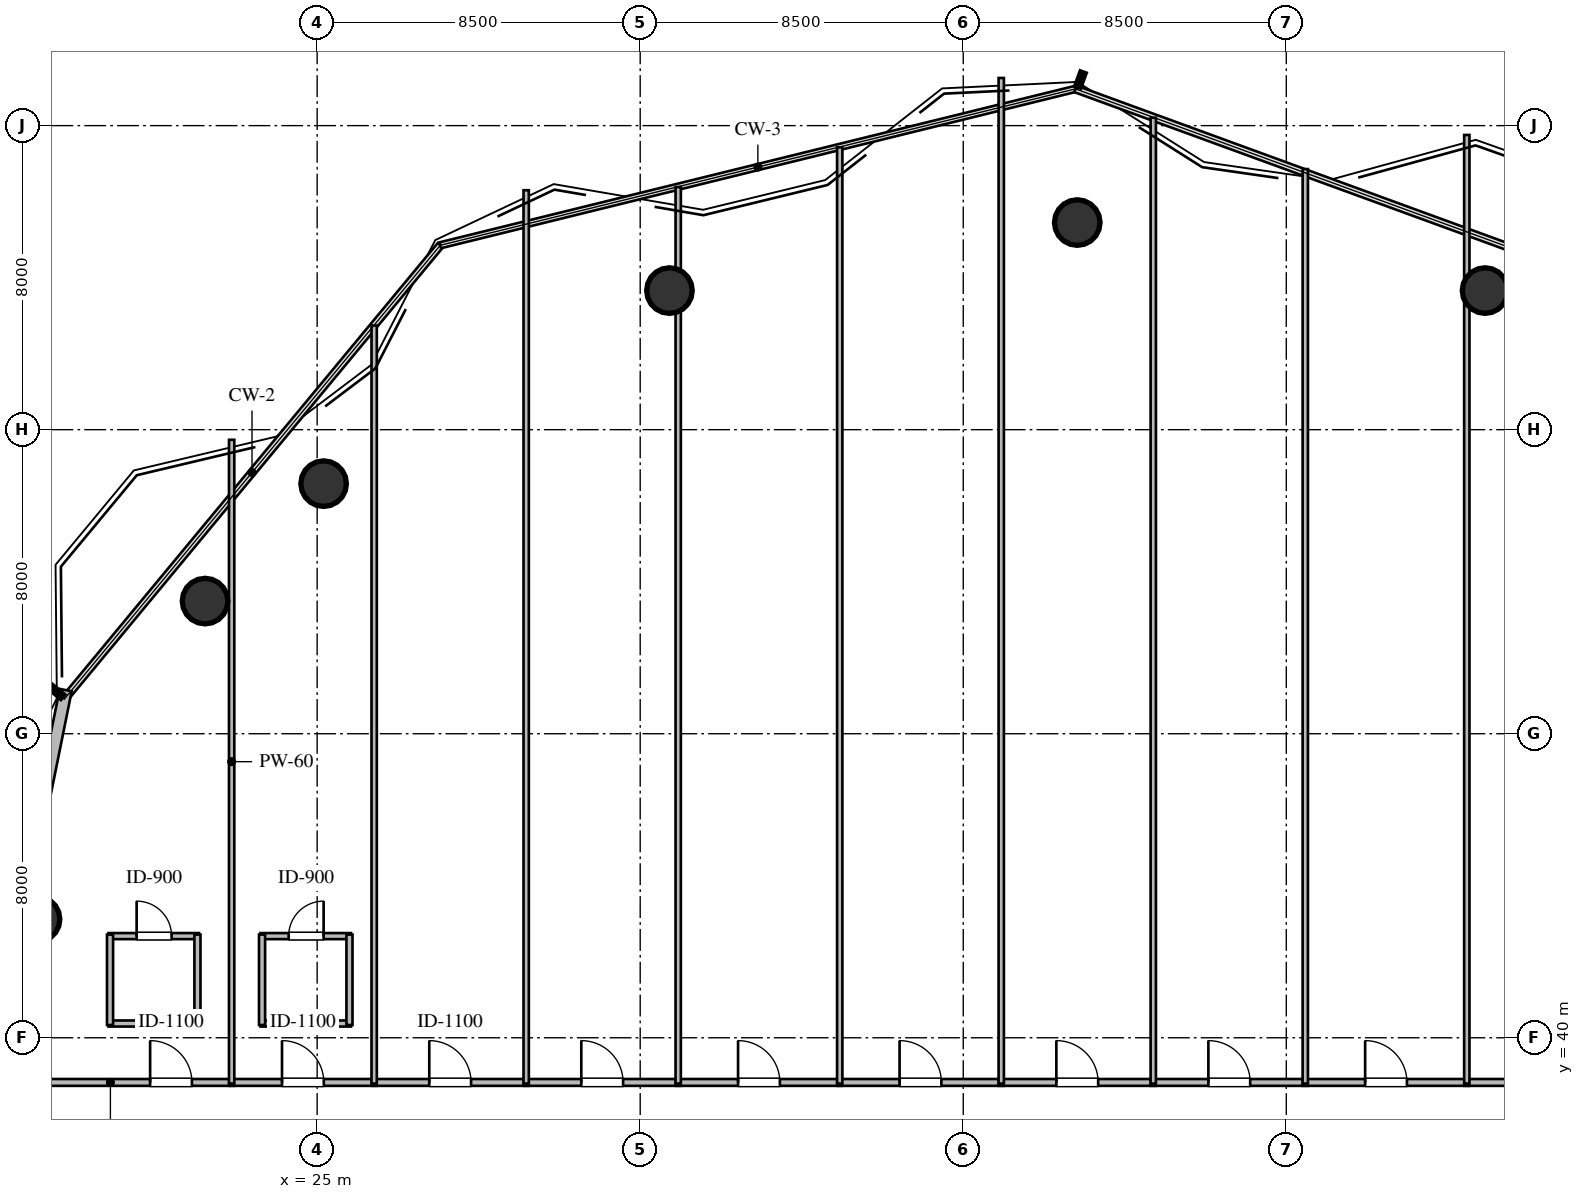
"""IFC4 building model, lengths in metres.
Left out: names, types, materials, properties, quantities, classifications, styles, units other than length and angle.
Written with IfcOpenShell. Run it as: python <this file> out.ifc"""

import sys

from ifc_helpers import new_model, si_unit, direction, frame, frame_2d, origin, origin_2d, place, context, subcontext, project, spatial, rectangle, circle, extrude, element, fill, save


model = new_model("IFC4")
c1 = context("Model", 3, precision=1e-05, world=origin(), true_north=direction((0.0, 1.0)))
c2 = subcontext(c1, "Body", "Model", "MODEL_VIEW")
j1 = project(units=[si_unit("LENGTHUNIT", "METRE"), si_unit("PLANEANGLEUNIT", "RADIAN")], contexts=[c1])
p1 = place(None, origin())
s1 = spatial("IfcSite", under=j1, at=p1, CompositionType="ELEMENT")
p2 = place(p1, origin())
s2 = spatial("IfcBuilding", under=s1, at=p2, CompositionType="ELEMENT")
p3 = place(p2, frame((0.0, 0.0, 142.2)))
s3 = spatial("IfcBuildingStorey", under=s2, at=p3, CompositionType="ELEMENT", Elevation=142.2)
for number, where, z_axis, x_axis in (
    (1, (55.73, 59.66, 0.0), (0.0, 0.0, 1.0), (1.0, 0.0, 0.0)),
    (2, (45.0, 61.45, 0.0), (0.0, 0.0, 1.0), (1.0, 0.0, 0.0)),
    (3, (34.27, 59.66, 0.0), (0.0, 0.0, 1.0), (1.0, 0.0, 0.0)),
    (4, (25.17, 54.58, 0.0), (0.0, 0.0, 1.0), (1.0, 0.0, 0.0)),
    (5, (22.05, 51.49, 0.0), (0.0, 0.0, 1.0), (1.0, 0.0, 0.0)),
    (6, (17.63, 43.12, 0.0), (0.0, 0.0, 1.0), (1.0, 0.0, 0.0)),
):
    element("IfcColumn", number, at=place(p3, frame(where, z_axis=z_axis, x_axis=x_axis)), inside=s3, PredefinedType="COLUMN", context=c2, shape_type="SweptSolid", body=[
        extrude(circle(Radius=0.6, at=origin_2d()), origin(), (0.0, 0.0, 1.0), 3.6),
    ])
p4 = place(p3, frame((15.514, 34.967, 0.0), z_axis=(0.0, 0.0, 1.0), x_axis=(0.198370893133, 0.980127026848, 0.0)))
e7 = element("IfcWall", 7, at=p4, inside=s3, PredefinedType="STANDARD", context=c2, shape_type="SweptSolid", body=[
    extrude(rectangle(XDim=14.469, YDim=0.32, at=frame_2d((7.234, 0.0))), origin(), (0.0, 0.0, 1.0), 3.36),
])
p5 = place(p3, frame((19.51, 40.375, 0.0), z_axis=(0.0, 0.0, 1.0), x_axis=(1.0, 0.0, 0.0)))
e8 = element("IfcWall", 8, at=p5, inside=s3, PredefinedType="PLUMBINGWALL", context=c2, shape_type="SweptSolid", body=[
    extrude(rectangle(XDim=2.38, YDim=0.16, at=frame_2d((1.19, 0.0))), origin(), (0.0, 0.0, 1.0), 3.36),
])
p6 = place(p3, frame((19.51, 42.675, 0.0), z_axis=(0.0, 0.0, 1.0), x_axis=(1.0, 0.0, 0.0)))
e9 = element("IfcWall", 9, at=p6, inside=s3, PredefinedType="PLUMBINGWALL", context=c2, shape_type="SweptSolid", body=[
    extrude(rectangle(XDim=2.38, YDim=0.16, at=frame_2d((1.19, 0.0))), origin(), (0.0, 0.0, 1.0), 3.36),
])
p7 = place(p6, frame((0.74, 0.0, 0.0)))
e10 = element("IfcOpeningElement", 10, at=p7, cuts=e9, PredefinedType="OPENING", context=c2, shape_type="SweptSolid", body=[
    extrude(rectangle(XDim=0.92, YDim=2.1, at=frame_2d((0.46, 1.05))), frame((0.0, 0.09, 0.0), z_axis=(0.0, -1.0, 0.0), x_axis=(1.0, 0.0, 0.0)), (0.0, 0.0, 1.0), 0.18),
])
p8 = place(p3, frame((19.55, 40.335, 0.0), z_axis=(0.0, 0.0, 1.0), x_axis=(0.0, 1.0, 0.0)))
e11 = element("IfcWall", 11, at=p8, inside=s3, PredefinedType="PLUMBINGWALL", context=c2, shape_type="SweptSolid", body=[
    extrude(rectangle(XDim=2.38, YDim=0.16, at=frame_2d((1.19, 0.0))), origin(), (0.0, 0.0, 1.0), 3.36),
])
p9 = place(p3, frame((21.85, 40.335, 0.0), z_axis=(0.0, 0.0, 1.0), x_axis=(0.0, 1.0, 0.0)))
e12 = element("IfcWall", 12, at=p9, inside=s3, PredefinedType="PLUMBINGWALL", context=c2, shape_type="SweptSolid", body=[
    extrude(rectangle(XDim=2.38, YDim=0.16, at=frame_2d((1.19, 0.0))), origin(), (0.0, 0.0, 1.0), 2.89),
])
p10 = place(p3, frame((23.51, 40.375, 0.0), z_axis=(0.0, 0.0, 1.0), x_axis=(1.0, 0.0, 0.0)))
e13 = element("IfcWall", 13, at=p10, inside=s3, PredefinedType="PLUMBINGWALL", context=c2, shape_type="SweptSolid", body=[
    extrude(rectangle(XDim=2.38, YDim=0.16, at=frame_2d((1.19, 0.0))), origin(), (0.0, 0.0, 1.0), 3.36),
])
p11 = place(p3, frame((23.51, 42.675, 0.0), z_axis=(0.0, 0.0, 1.0), x_axis=(1.0, 0.0, 0.0)))
e14 = element("IfcWall", 14, at=p11, inside=s3, PredefinedType="PLUMBINGWALL", context=c2, shape_type="SweptSolid", body=[
    extrude(rectangle(XDim=2.38, YDim=0.16, at=frame_2d((1.19, 0.0))), origin(), (0.0, 0.0, 1.0), 3.36),
])
p12 = place(p11, frame((0.74, 0.0, 0.0)))
e15 = element("IfcOpeningElement", 15, at=p12, cuts=e14, PredefinedType="OPENING", context=c2, shape_type="SweptSolid", body=[
    extrude(rectangle(XDim=0.92, YDim=2.1, at=frame_2d((0.46, 1.05))), frame((0.0, 0.09, 0.0), z_axis=(0.0, -1.0, 0.0), x_axis=(1.0, 0.0, 0.0)), (0.0, 0.0, 1.0), 0.18),
])
p13 = place(p3, frame((23.55, 40.335, 0.0), z_axis=(0.0, 0.0, 1.0), x_axis=(0.0, 1.0, 0.0)))
e16 = element("IfcWall", 16, at=p13, inside=s3, PredefinedType="PLUMBINGWALL", context=c2, shape_type="SweptSolid", body=[
    extrude(rectangle(XDim=2.38, YDim=0.16, at=frame_2d((1.19, 0.0))), origin(), (0.0, 0.0, 1.0), 2.89),
])
p14 = place(p3, frame((25.85, 40.335, 0.0), z_axis=(0.0, 0.0, 1.0), x_axis=(0.0, 1.0, 0.0)))
e17 = element("IfcWall", 17, at=p14, inside=s3, PredefinedType="PLUMBINGWALL", context=c2, shape_type="SweptSolid", body=[
    extrude(rectangle(XDim=2.38, YDim=0.16, at=frame_2d((1.19, 0.0))), origin(), (0.0, 0.0, 1.0), 3.36),
])
p15 = place(p3, frame((16.305, 38.825, 0.0), z_axis=(0.0, 0.0, 1.0), x_axis=(1.0, 0.0, 0.0)))
e18 = element("IfcWall", 18, at=p15, inside=s3, PredefinedType="PARTITIONING", context=c2, shape_type="SweptSolid", body=[
    extrude(rectangle(XDim=6.51, YDim=0.18, at=frame_2d((3.255, 0.0))), origin(), (0.0, 0.0, 1.0), 3.36),
])
p16 = place(p15, frame((4.3, 0.0, 0.0)))
e19 = element("IfcOpeningElement", 19, at=p16, cuts=e18, PredefinedType="OPENING", context=c2, shape_type="SweptSolid", body=[
    extrude(rectangle(XDim=1.1, YDim=2.1, at=frame_2d((0.55, 1.05))), frame((0.0, 0.1, 0.0), z_axis=(0.0, -1.0, 0.0), x_axis=(1.0, 0.0, 0.0)), (0.0, 0.0, 1.0), 0.2),
])
p17 = place(p3, frame((22.685, 38.825, 0.0), z_axis=(0.0, 0.0, 1.0), x_axis=(1.0, 0.0, 0.0)))
e20 = element("IfcWall", 20, at=p17, inside=s3, PredefinedType="PARTITIONING", context=c2, shape_type="SweptSolid", body=[
    extrude(rectangle(XDim=3.88, YDim=0.18, at=frame_2d((1.94, 0.0))), origin(), (0.0, 0.0, 1.0), 3.36),
])
p18 = place(p17, frame((1.39, 0.0, 0.0)))
e21 = element("IfcOpeningElement", 21, at=p18, cuts=e20, PredefinedType="OPENING", context=c2, shape_type="SweptSolid", body=[
    extrude(rectangle(XDim=1.1, YDim=2.1, at=frame_2d((0.55, 1.05))), frame((0.0, 0.1, 0.0), z_axis=(0.0, -1.0, 0.0), x_axis=(1.0, 0.0, 0.0)), (0.0, 0.0, 1.0), 0.2),
])
p19 = place(p3, frame((26.435, 38.825, 0.0), z_axis=(0.0, 0.0, 1.0), x_axis=(1.0, 0.0, 0.0)))
e22 = element("IfcWall", 22, at=p19, inside=s3, PredefinedType="PARTITIONING", context=c2, shape_type="SweptSolid", body=[
    extrude(rectangle(XDim=4.13, YDim=0.18, at=frame_2d((2.065, 0.0))), origin(), (0.0, 0.0, 1.0), 3.36),
])
p20 = place(p19, frame((1.515, 0.0, 0.0)))
e23 = element("IfcOpeningElement", 23, at=p20, cuts=e22, PredefinedType="OPENING", context=c2, shape_type="SweptSolid", body=[
    extrude(rectangle(XDim=1.1, YDim=2.1, at=frame_2d((0.55, 1.05))), frame((0.0, 0.1, 0.0), z_axis=(0.0, -1.0, 0.0), x_axis=(1.0, 0.0, 0.0)), (0.0, 0.0, 1.0), 0.2),
])
p21 = place(p3, frame((30.435, 38.825, 0.0), z_axis=(0.0, 0.0, 1.0), x_axis=(1.0, 0.0, 0.0)))
e24 = element("IfcWall", 24, at=p21, inside=s3, PredefinedType="PARTITIONING", context=c2, shape_type="SweptSolid", body=[
    extrude(rectangle(XDim=4.13, YDim=0.18, at=frame_2d((2.065, 0.0))), origin(), (0.0, 0.0, 1.0), 3.36),
])
p22 = place(p21, frame((1.515, 0.0, 0.0)))
e25 = element("IfcOpeningElement", 25, at=p22, cuts=e24, PredefinedType="OPENING", context=c2, shape_type="SweptSolid", body=[
    extrude(rectangle(XDim=1.1, YDim=2.1, at=frame_2d((0.55, 1.05))), frame((0.0, 0.1, 0.0), z_axis=(0.0, -1.0, 0.0), x_axis=(1.0, 0.0, 0.0)), (0.0, 0.0, 1.0), 0.2),
])
p23 = place(p3, frame((34.435, 38.825, 0.0), z_axis=(0.0, 0.0, 1.0), x_axis=(1.0, 0.0, 0.0)))
e26 = element("IfcWall", 26, at=p23, inside=s3, PredefinedType="PARTITIONING", context=c2, shape_type="SweptSolid", body=[
    extrude(rectangle(XDim=4.38, YDim=0.18, at=frame_2d((2.19, 0.0))), origin(), (0.0, 0.0, 1.0), 3.36),
])
p24 = place(p23, frame((1.64, 0.0, 0.0)))
e27 = element("IfcOpeningElement", 27, at=p24, cuts=e26, PredefinedType="OPENING", context=c2, shape_type="SweptSolid", body=[
    extrude(rectangle(XDim=1.1, YDim=2.1, at=frame_2d((0.55, 1.05))), frame((0.0, 0.1, 0.0), z_axis=(0.0, -1.0, 0.0), x_axis=(1.0, 0.0, 0.0)), (0.0, 0.0, 1.0), 0.2),
])
p25 = place(p3, frame((38.685, 38.825, 0.0), z_axis=(0.0, 0.0, 1.0), x_axis=(1.0, 0.0, 0.0)))
e28 = element("IfcWall", 28, at=p25, inside=s3, PredefinedType="PARTITIONING", context=c2, shape_type="SweptSolid", body=[
    extrude(rectangle(XDim=4.38, YDim=0.18, at=frame_2d((2.19, 0.0))), origin(), (0.0, 0.0, 1.0), 3.36),
])
p26 = place(p25, frame((1.64, 0.0, 0.0)))
e29 = element("IfcOpeningElement", 29, at=p26, cuts=e28, PredefinedType="OPENING", context=c2, shape_type="SweptSolid", body=[
    extrude(rectangle(XDim=1.1, YDim=2.1, at=frame_2d((0.55, 1.05))), frame((0.0, 0.1, 0.0), z_axis=(0.0, -1.0, 0.0), x_axis=(1.0, 0.0, 0.0)), (0.0, 0.0, 1.0), 0.2),
])
p27 = place(p3, frame((42.935, 38.825, 0.0), z_axis=(0.0, 0.0, 1.0), x_axis=(1.0, 0.0, 0.0)))
e30 = element("IfcWall", 30, at=p27, inside=s3, PredefinedType="PARTITIONING", context=c2, shape_type="SweptSolid", body=[
    extrude(rectangle(XDim=4.13, YDim=0.18, at=frame_2d((2.065, 0.0))), origin(), (0.0, 0.0, 1.0), 3.36),
])
p28 = place(p27, frame((1.515, 0.0, 0.0)))
e31 = element("IfcOpeningElement", 31, at=p28, cuts=e30, PredefinedType="OPENING", context=c2, shape_type="SweptSolid", body=[
    extrude(rectangle(XDim=1.1, YDim=2.1, at=frame_2d((0.55, 1.05))), frame((0.0, 0.1, 0.0), z_axis=(0.0, -1.0, 0.0), x_axis=(1.0, 0.0, 0.0)), (0.0, 0.0, 1.0), 0.2),
])
p29 = place(p3, frame((46.935, 38.825, 0.0), z_axis=(0.0, 0.0, 1.0), x_axis=(1.0, 0.0, 0.0)))
e32 = element("IfcWall", 32, at=p29, inside=s3, PredefinedType="PARTITIONING", context=c2, shape_type="SweptSolid", body=[
    extrude(rectangle(XDim=4.13, YDim=0.18, at=frame_2d((2.065, 0.0))), origin(), (0.0, 0.0, 1.0), 3.36),
])
p30 = place(p29, frame((1.515, 0.0, 0.0)))
e33 = element("IfcOpeningElement", 33, at=p30, cuts=e32, PredefinedType="OPENING", context=c2, shape_type="SweptSolid", body=[
    extrude(rectangle(XDim=1.1, YDim=2.1, at=frame_2d((0.55, 1.05))), frame((0.0, 0.1, 0.0), z_axis=(0.0, -1.0, 0.0), x_axis=(1.0, 0.0, 0.0)), (0.0, 0.0, 1.0), 0.2),
])
p31 = place(p3, frame((50.935, 38.825, 0.0), z_axis=(0.0, 0.0, 1.0), x_axis=(1.0, 0.0, 0.0)))
e34 = element("IfcWall", 34, at=p31, inside=s3, PredefinedType="PARTITIONING", context=c2, shape_type="SweptSolid", body=[
    extrude(rectangle(XDim=4.38, YDim=0.18, at=frame_2d((2.19, 0.0))), origin(), (0.0, 0.0, 1.0), 3.36),
])
p32 = place(p31, frame((1.64, 0.0, 0.0)))
e35 = element("IfcOpeningElement", 35, at=p32, cuts=e34, PredefinedType="OPENING", context=c2, shape_type="SweptSolid", body=[
    extrude(rectangle(XDim=1.1, YDim=2.1, at=frame_2d((0.55, 1.05))), frame((0.0, 0.1, 0.0), z_axis=(0.0, -1.0, 0.0), x_axis=(1.0, 0.0, 0.0)), (0.0, 0.0, 1.0), 0.2),
])
p33 = place(p3, frame((55.185, 38.825, 0.0), z_axis=(0.0, 0.0, 1.0), x_axis=(1.0, 0.0, 0.0)))
e36 = element("IfcWall", 36, at=p33, inside=s3, PredefinedType="PARTITIONING", context=c2, shape_type="SweptSolid", body=[
    extrude(rectangle(XDim=4.38, YDim=0.18, at=frame_2d((2.19, 0.0))), origin(), (0.0, 0.0, 1.0), 3.36),
])
p34 = place(p33, frame((1.64, 0.0, 0.0)))
e37 = element("IfcOpeningElement", 37, at=p34, cuts=e36, PredefinedType="OPENING", context=c2, shape_type="SweptSolid", body=[
    extrude(rectangle(XDim=1.1, YDim=2.1, at=frame_2d((0.55, 1.05))), frame((0.0, 0.1, 0.0), z_axis=(0.0, -1.0, 0.0), x_axis=(1.0, 0.0, 0.0)), (0.0, 0.0, 1.0), 0.2),
])
p35 = place(p3, frame((22.75, 55.734, 0.0), z_axis=(0.0, 0.0, 1.0), x_axis=(0.0, -1.0, 0.0)))
e38 = element("IfcWall", 38, at=p35, inside=s3, PredefinedType="PARTITIONING", context=c2, shape_type="SweptSolid", body=[
    extrude(rectangle(XDim=16.939, YDim=0.14, at=frame_2d((8.469, 0.0))), origin(), (0.0, 0.0, 1.0), 2.89),
])
p36 = place(p3, frame((26.5, 58.742, 0.0), z_axis=(0.0, 0.0, 1.0), x_axis=(0.0, -1.0, 0.0)))
e39 = element("IfcWall", 39, at=p36, inside=s3, PredefinedType="PARTITIONING", context=c2, shape_type="SweptSolid", body=[
    extrude(rectangle(XDim=19.947, YDim=0.14, at=frame_2d((9.973, 0.0))), origin(), (0.0, 0.0, 1.0), 3.36),
])
p37 = place(p3, frame((30.5, 62.3, 0.0), z_axis=(0.0, 0.0, 1.0), x_axis=(0.0, -1.0, 0.0)))
e40 = element("IfcWall", 40, at=p37, inside=s3, PredefinedType="PARTITIONING", context=c2, shape_type="SweptSolid", body=[
    extrude(rectangle(XDim=23.505, YDim=0.14, at=frame_2d((11.752, 0.0))), origin(), (0.0, 0.0, 1.0), 3.36),
])
p38 = place(p3, frame((34.5, 62.383, 0.0), z_axis=(0.0, 0.0, 1.0), x_axis=(0.0, -1.0, 0.0)))
e41 = element("IfcWall", 41, at=p38, inside=s3, PredefinedType="PARTITIONING", context=c2, shape_type="SweptSolid", body=[
    extrude(rectangle(XDim=23.588, YDim=0.14, at=frame_2d((11.794, 0.0))), origin(), (0.0, 0.0, 1.0), 2.89),
])
p39 = place(p3, frame((38.75, 63.43, 0.0), z_axis=(0.0, 0.0, 1.0), x_axis=(0.0, -1.0, 0.0)))
e42 = element("IfcWall", 42, at=p39, inside=s3, PredefinedType="PARTITIONING", context=c2, shape_type="SweptSolid", body=[
    extrude(rectangle(XDim=24.635, YDim=0.14, at=frame_2d((12.317, 0.0))), origin(), (0.0, 0.0, 1.0), 3.36),
])
p40 = place(p3, frame((43.0, 65.254, 0.0), z_axis=(0.0, 0.0, 1.0), x_axis=(0.0, -1.0, 0.0)))
e43 = element("IfcWall", 43, at=p40, inside=s3, PredefinedType="PARTITIONING", context=c2, shape_type="SweptSolid", body=[
    extrude(rectangle(XDim=26.459, YDim=0.14, at=frame_2d((13.229, 0.0))), origin(), (0.0, 0.0, 1.0), 3.36),
])
p41 = place(p3, frame((47.0, 64.209, 0.0), z_axis=(0.0, 0.0, 1.0), x_axis=(0.0, -1.0, 0.0)))
e44 = element("IfcWall", 44, at=p41, inside=s3, PredefinedType="PARTITIONING", context=c2, shape_type="SweptSolid", body=[
    extrude(rectangle(XDim=25.414, YDim=0.14, at=frame_2d((12.707, 0.0))), origin(), (0.0, 0.0, 1.0), 3.36),
])
p42 = place(p3, frame((51.0, 62.857, 0.0), z_axis=(0.0, 0.0, 1.0), x_axis=(0.0, -1.0, 0.0)))
e45 = element("IfcWall", 45, at=p42, inside=s3, PredefinedType="PARTITIONING", context=c2, shape_type="SweptSolid", body=[
    extrude(rectangle(XDim=24.062, YDim=0.14, at=frame_2d((12.031, 0.0))), origin(), (0.0, 0.0, 1.0), 3.36),
])
p43 = place(p3, frame((55.25, 63.755, 0.0), z_axis=(0.0, 0.0, 1.0), x_axis=(0.0, -1.0, 0.0)))
e46 = element("IfcWall", 46, at=p43, inside=s3, PredefinedType="PARTITIONING", context=c2, shape_type="SweptSolid", body=[
    extrude(rectangle(XDim=24.96, YDim=0.14, at=frame_2d((12.48, 0.0))), origin(), (0.0, 0.0, 1.0), 3.36),
])
p44 = place(p7, origin())
e47 = element("IfcDoor", 47, at=p44, inside=s3, OperationType="SINGLE_SWING_LEFT", PredefinedType="DOOR", context=c2, shape_type="SweptSolid", body=[
    extrude(rectangle(XDim=0.92, YDim=2.1, at=frame_2d((0.46, 1.05))), frame((0.0, 0.025, 0.0), z_axis=(0.0, -1.0, 0.0), x_axis=(1.0, 0.0, 0.0)), (0.0, 0.0, 1.0), 0.05),
])
fill(e10, e47)
p45 = place(p12, origin())
e48 = element("IfcDoor", 48, at=p45, inside=s3, OperationType="SINGLE_SWING_RIGHT", PredefinedType="DOOR", context=c2, shape_type="SweptSolid", body=[
    extrude(rectangle(XDim=0.92, YDim=2.1, at=frame_2d((0.46, 1.05))), frame((0.0, 0.025, 0.0), z_axis=(0.0, -1.0, 0.0), x_axis=(1.0, 0.0, 0.0)), (0.0, 0.0, 1.0), 0.05),
])
fill(e15, e48)
p46 = place(p16, origin())
e49 = element("IfcDoor", 49, at=p46, inside=s3, OperationType="SINGLE_SWING_LEFT", PredefinedType="DOOR", context=c2, shape_type="SweptSolid", body=[
    extrude(rectangle(XDim=1.1, YDim=2.1, at=frame_2d((0.55, 1.05))), frame((0.0, 0.025, 0.0), z_axis=(0.0, -1.0, 0.0), x_axis=(1.0, 0.0, 0.0)), (0.0, 0.0, 1.0), 0.05),
])
fill(e19, e49)
p47 = place(p18, origin())
e50 = element("IfcDoor", 50, at=p47, inside=s3, OperationType="SINGLE_SWING_LEFT", PredefinedType="DOOR", context=c2, shape_type="SweptSolid", body=[
    extrude(rectangle(XDim=1.1, YDim=2.1, at=frame_2d((0.55, 1.05))), frame((0.0, 0.025, 0.0), z_axis=(0.0, -1.0, 0.0), x_axis=(1.0, 0.0, 0.0)), (0.0, 0.0, 1.0), 0.05),
])
fill(e21, e50)
p48 = place(p20, origin())
e51 = element("IfcDoor", 51, at=p48, inside=s3, OperationType="SINGLE_SWING_LEFT", PredefinedType="DOOR", context=c2, shape_type="SweptSolid", body=[
    extrude(rectangle(XDim=1.1, YDim=2.1, at=frame_2d((0.55, 1.05))), frame((0.0, 0.025, 0.0), z_axis=(0.0, -1.0, 0.0), x_axis=(1.0, 0.0, 0.0)), (0.0, 0.0, 1.0), 0.05),
])
fill(e23, e51)
p49 = place(p22, origin())
e52 = element("IfcDoor", 52, at=p49, inside=s3, OperationType="SINGLE_SWING_LEFT", PredefinedType="DOOR", context=c2, shape_type="SweptSolid", body=[
    extrude(rectangle(XDim=1.1, YDim=2.1, at=frame_2d((0.55, 1.05))), frame((0.0, 0.025, 0.0), z_axis=(0.0, -1.0, 0.0), x_axis=(1.0, 0.0, 0.0)), (0.0, 0.0, 1.0), 0.05),
])
fill(e25, e52)
p50 = place(p24, origin())
e53 = element("IfcDoor", 53, at=p50, inside=s3, OperationType="SINGLE_SWING_LEFT", PredefinedType="DOOR", context=c2, shape_type="SweptSolid", body=[
    extrude(rectangle(XDim=1.1, YDim=2.1, at=frame_2d((0.55, 1.05))), frame((0.0, 0.025, 0.0), z_axis=(0.0, -1.0, 0.0), x_axis=(1.0, 0.0, 0.0)), (0.0, 0.0, 1.0), 0.05),
])
fill(e27, e53)
p51 = place(p26, origin())
e54 = element("IfcDoor", 54, at=p51, inside=s3, OperationType="SINGLE_SWING_LEFT", PredefinedType="DOOR", context=c2, shape_type="SweptSolid", body=[
    extrude(rectangle(XDim=1.1, YDim=2.1, at=frame_2d((0.55, 1.05))), frame((0.0, 0.025, 0.0), z_axis=(0.0, -1.0, 0.0), x_axis=(1.0, 0.0, 0.0)), (0.0, 0.0, 1.0), 0.05),
])
fill(e29, e54)
p52 = place(p28, origin())
e55 = element("IfcDoor", 55, at=p52, inside=s3, OperationType="SINGLE_SWING_LEFT", PredefinedType="DOOR", context=c2, shape_type="SweptSolid", body=[
    extrude(rectangle(XDim=1.1, YDim=2.1, at=frame_2d((0.55, 1.05))), frame((0.0, 0.025, 0.0), z_axis=(0.0, -1.0, 0.0), x_axis=(1.0, 0.0, 0.0)), (0.0, 0.0, 1.0), 0.05),
])
fill(e31, e55)
p53 = place(p30, origin())
e56 = element("IfcDoor", 56, at=p53, inside=s3, OperationType="SINGLE_SWING_LEFT", PredefinedType="DOOR", context=c2, shape_type="SweptSolid", body=[
    extrude(rectangle(XDim=1.1, YDim=2.1, at=frame_2d((0.55, 1.05))), frame((0.0, 0.025, 0.0), z_axis=(0.0, -1.0, 0.0), x_axis=(1.0, 0.0, 0.0)), (0.0, 0.0, 1.0), 0.05),
])
fill(e33, e56)
p54 = place(p32, origin())
e57 = element("IfcDoor", 57, at=p54, inside=s3, OperationType="SINGLE_SWING_LEFT", PredefinedType="DOOR", context=c2, shape_type="SweptSolid", body=[
    extrude(rectangle(XDim=1.1, YDim=2.1, at=frame_2d((0.55, 1.05))), frame((0.0, 0.025, 0.0), z_axis=(0.0, -1.0, 0.0), x_axis=(1.0, 0.0, 0.0)), (0.0, 0.0, 1.0), 0.05),
])
fill(e35, e57)
save(model, sys.argv[1])
